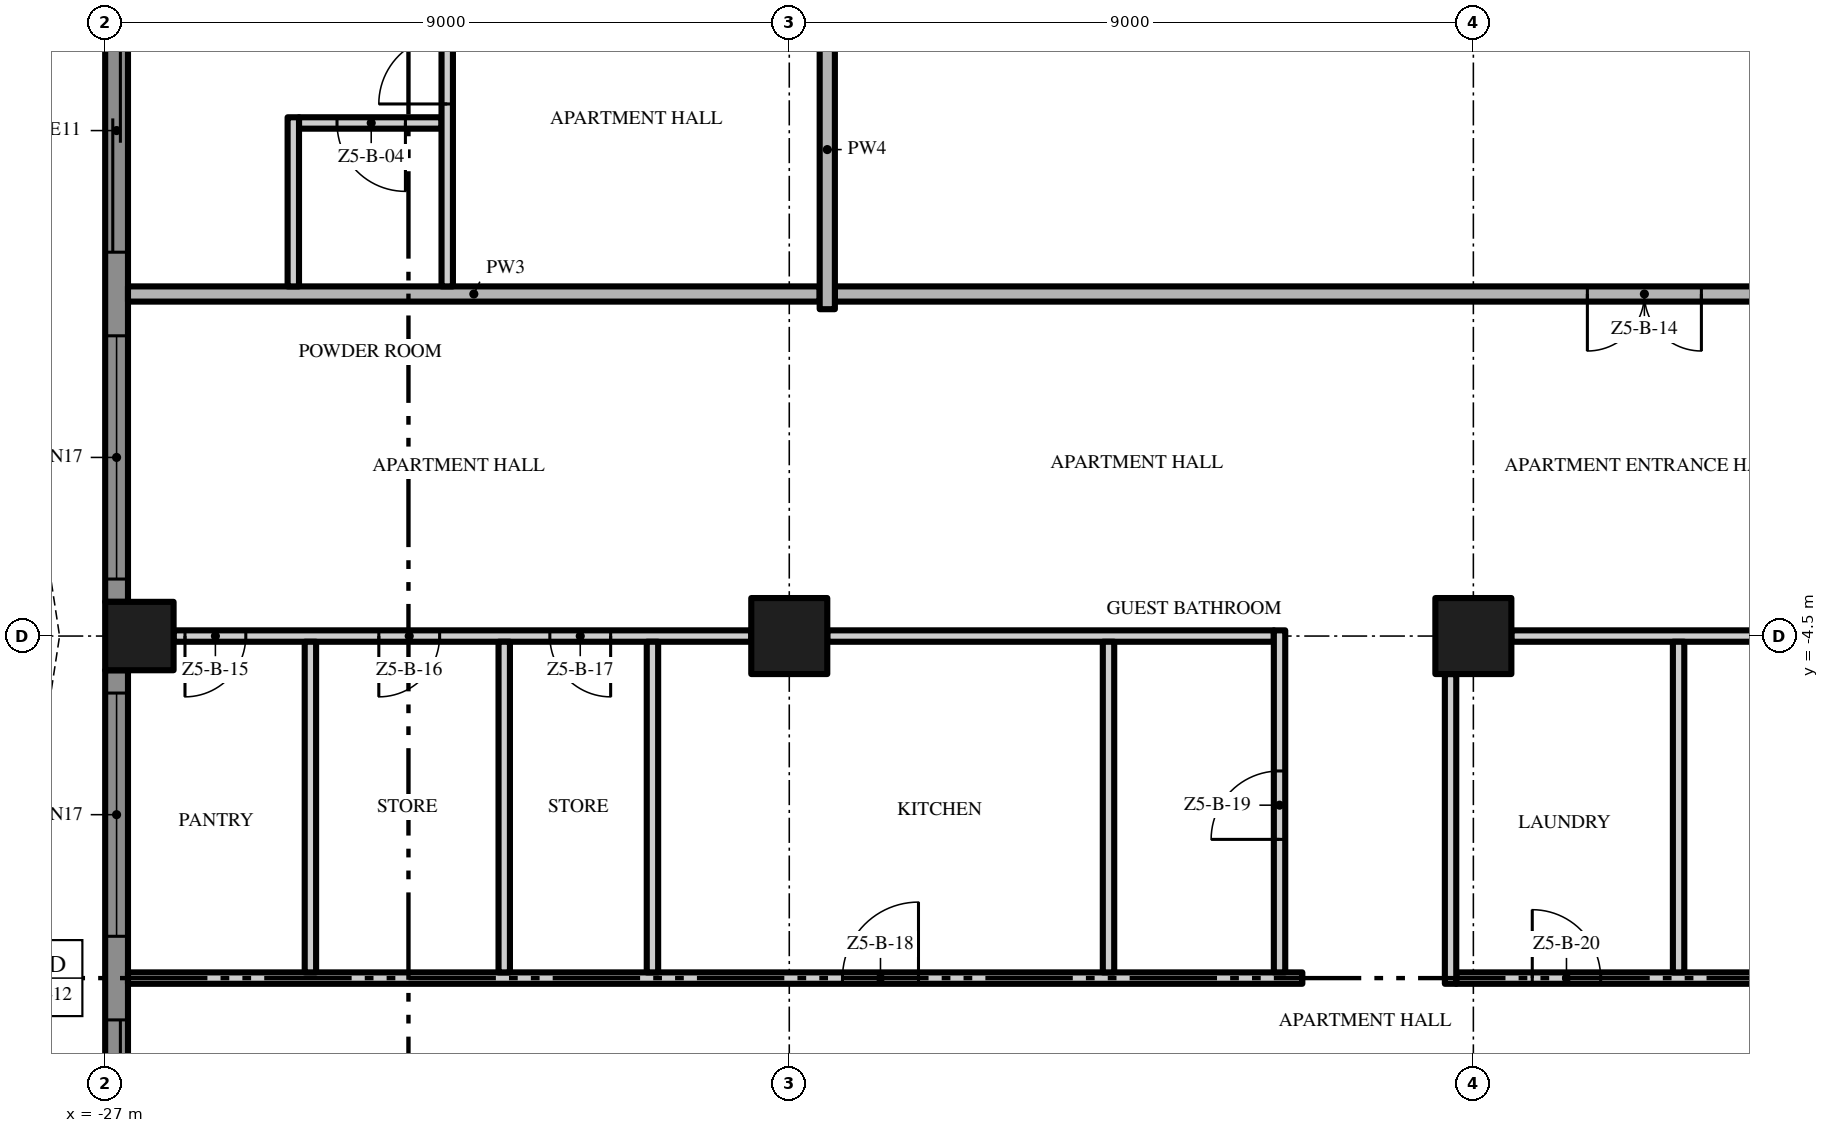
"""IFC4 building model, lengths in metres.
Left out: names, types, materials, properties, quantities, classifications, styles, units other than length and angle.
Written with IfcOpenShell. Run it as: python <this file> out.ifc"""

import sys

from ifc_helpers import new_model, si_unit, direction, frame, frame_2d, origin, origin_2d, place, context, subcontext, project, spatial, polyline, rectangle, outline, extrude, element, fill, save


model = new_model("IFC4")
c1 = context("Model", 3, precision=1e-05, world=origin(), true_north=direction((0.0, 1.0)))
c2 = subcontext(c1, "Body", "Model", "MODEL_VIEW")
j1 = project(units=[si_unit("LENGTHUNIT", "METRE"), si_unit("PLANEANGLEUNIT", "RADIAN")], contexts=[c1])
p1 = place(None, origin())
s1 = spatial("IfcSite", under=j1, at=p1, CompositionType="ELEMENT")
p2 = place(p1, origin())
s2 = spatial("IfcBuilding", under=s1, at=p2, CompositionType="ELEMENT")
p3 = place(p2, frame((0.0, 0.0, 250.2)))
s3 = spatial("IfcBuildingStorey", under=s2, at=p3, CompositionType="ELEMENT", Elevation=250.2)
p4 = place(p3, frame((-18.0, -4.5, 0.0), z_axis=(0.0, 0.0, 1.0), x_axis=(1.0, 0.0, 0.0)))
e1 = element("IfcColumn", 1, at=p4, inside=s3, PredefinedType="COLUMN", context=c2, shape_type="SweptSolid", body=[
    extrude(rectangle(XDim=1.0, YDim=1.0, at=origin_2d()), origin(), (0.0, 0.0, 1.0), 3.5),
])
p5 = place(p3, frame((-26.55, -4.5, 0.0), z_axis=(0.0, 0.0, 1.0), x_axis=(1.0, 0.0, 0.0)))
e2 = element("IfcColumn", 2, at=p5, inside=s3, PredefinedType="COLUMN", context=c2, shape_type="SweptSolid", body=[
    extrude(rectangle(XDim=0.9, YDim=0.9, at=origin_2d()), origin(), (0.0, 0.0, 1.0), 3.5),
])
p6 = place(p3, frame((-9.0, -4.5, 0.0), z_axis=(0.0, 0.0, 1.0), x_axis=(1.0, 0.0, 0.0)))
e3 = element("IfcColumn", 3, at=p6, inside=s3, PredefinedType="COLUMN", context=c2, shape_type="SweptSolid", body=[
    extrude(rectangle(XDim=1.0, YDim=1.0, at=origin_2d()), origin(), (0.0, 0.0, 1.0), 3.5),
])
p7 = place(p3, frame((-26.85, -4.05, 0.0), z_axis=(0.0, 0.0, 1.0), x_axis=(0.0, 1.0, 0.0)))
e4 = element("IfcWall", 4, at=p7, inside=s3, PredefinedType="SOLIDWALL", context=c2, shape_type="SweptSolid", body=[
    extrude(rectangle(XDim=8.1, YDim=0.3, at=frame_2d((4.05, 0.0))), origin(), (0.0, 0.0, 1.0), 3.5),
])
p8 = place(p7, frame((4.6, 0.0, 0.0)))
e5 = element("IfcOpeningElement", 5, at=p8, cuts=e4, PredefinedType="OPENING", context=c2, shape_type="SweptSolid", body=[
    extrude(rectangle(XDim=3.2, YDim=2.4, at=frame_2d((1.6, 1.2))), frame((0.0, 0.16, 0.0), z_axis=(0.0, -1.0, 0.0), x_axis=(1.0, 0.0, 0.0)), (0.0, 0.0, 1.0), 0.32),
])
p9 = place(p7, frame((0.3, 0.0, 0.45)))
e6 = element("IfcOpeningElement", 6, at=p9, cuts=e4, PredefinedType="OPENING", context=c2, shape_type="SweptSolid", body=[
    extrude(rectangle(XDim=3.2, YDim=2.65, at=frame_2d((1.6, 1.325))), frame((0.0, 0.16, 0.0), z_axis=(0.0, -1.0, 0.0), x_axis=(1.0, 0.0, 0.0)), (0.0, 0.0, 1.0), 0.32),
])
p10 = place(p3, frame((-26.85, -13.05, 0.0), z_axis=(0.0, 0.0, 1.0), x_axis=(0.0, 1.0, 0.0)))
e7 = element("IfcWall", 7, at=p10, inside=s3, PredefinedType="SOLIDWALL", context=c2, shape_type="SweptSolid", body=[
    extrude(rectangle(XDim=8.1, YDim=0.3, at=frame_2d((4.05, 0.0))), origin(), (0.0, 0.0, 1.0), 3.5),
])
p11 = place(p10, frame((4.6, 0.0, 0.45)))
e8 = element("IfcOpeningElement", 8, at=p11, cuts=e7, PredefinedType="OPENING", context=c2, shape_type="SweptSolid", body=[
    extrude(rectangle(XDim=3.2, YDim=2.65, at=frame_2d((1.6, 1.325))), frame((0.0, 0.16, 0.0), z_axis=(0.0, -1.0, 0.0), x_axis=(1.0, 0.0, 0.0)), (0.0, 0.0, 1.0), 0.32),
])
p12 = place(p10, frame((0.3, 0.0, 0.0)))
e9 = element("IfcOpeningElement", 9, at=p12, cuts=e7, PredefinedType="OPENING", context=c2, shape_type="SweptSolid", body=[
    extrude(rectangle(XDim=3.2, YDim=2.4, at=frame_2d((1.6, 1.2))), frame((0.0, 0.16, 0.0), z_axis=(0.0, -1.0, 0.0), x_axis=(1.0, 0.0, 0.0)), (0.0, 0.0, 1.0), 0.32),
])
p13 = place(p3, origin())
e10 = element("IfcWall", 10, at=p13, inside=s3, PredefinedType="USERDEFINED", context=c2, shape_type="SweptSolid", body=[
    extrude(outline(polyline([(-30.0, 18.0), (-29.771, 16.5), (-29.171, 15.0), (-28.429, 13.5), (-27.829, 12.0), (-27.6, 10.5), (-27.829, 9.0), (-28.429, 7.5), (-29.171, 6.0), (-29.771, 4.5), (-30.0, 3.0), (-29.771, 1.5), (-29.171, 0.0), (-28.429, -1.5), (-27.829, -3.0), (-27.6, -4.5), (-27.829, -6.0), (-28.429, -7.5), (-29.171, -9.0), (-29.771, -10.5), (-30.0, -12.0), (-29.771, -13.5), (-29.171, -15.0), (-28.429, -16.5), (-27.829, -18.0), (-27.597, -17.907), (-28.201, -16.398), (-28.942, -14.898), (-29.528, -13.434), (-29.747, -12.0), (-29.528, -10.566), (-28.942, -9.102), (-28.201, -7.602), (-27.586, -6.066), (-27.347, -4.5), (-27.586, -2.934), (-28.201, -1.398), (-28.942, 0.102), (-29.528, 1.566), (-29.747, 3.0), (-29.528, 4.434), (-28.942, 5.898), (-28.201, 7.398), (-27.586, 8.934), (-27.347, 10.5), (-27.586, 12.066), (-28.201, 13.602), (-28.942, 15.102), (-29.528, 16.566), (-29.753, 18.038), (-30.0, 18.0)])), origin(), (0.0, 0.0, 1.0), 0.9),
])
p14 = place(p3, frame((-26.7, -9.0, 0.0), z_axis=(0.0, 0.0, 1.0), x_axis=(1.0, 0.0, 0.0)))
e11 = element("IfcWall", 11, at=p14, inside=s3, PredefinedType="PARTITIONING", context=c2, shape_type="SweptSolid", body=[
    extrude(rectangle(XDim=15.45, YDim=0.15, at=frame_2d((7.725, 0.0))), origin(), (0.0, 0.0, 1.0), 3.5),
])
p15 = place(p14, frame((9.4, 0.0, 0.0)))
e12 = element("IfcOpeningElement", 12, at=p15, cuts=e11, PredefinedType="OPENING", context=c2, shape_type="SweptSolid", body=[
    extrude(rectangle(XDim=1.0, YDim=2.4, at=frame_2d((0.5, 1.2))), frame((0.0, 0.085, 0.0), z_axis=(0.0, -1.0, 0.0), x_axis=(1.0, 0.0, 0.0)), (0.0, 0.0, 1.0), 0.17),
])
p16 = place(p3, frame((-9.225, -9.0, 0.0), z_axis=(0.0, 0.0, 1.0), x_axis=(1.0, 0.0, 0.0)))
e13 = element("IfcWall", 13, at=p16, inside=s3, PredefinedType="PARTITIONING", context=c2, shape_type="SweptSolid", body=[
    extrude(rectangle(XDim=13.625, YDim=0.15, at=frame_2d((6.812, 0.0))), origin(), (0.0, 0.0, 1.0), 3.5),
])
p17 = place(p16, frame((1.0, 0.0, 0.0)))
e14 = element("IfcOpeningElement", 14, at=p17, cuts=e13, PredefinedType="OPENING", context=c2, shape_type="SweptSolid", body=[
    extrude(rectangle(XDim=0.9, YDim=2.1, at=frame_2d((0.45, 1.05))), frame((0.0, 0.085, 0.0), z_axis=(0.0, -1.0, 0.0), x_axis=(1.0, 0.0, 0.0)), (0.0, 0.0, 1.0), 0.17),
])
p18 = place(p16, frame((5.125, 0.0, 0.0)))
e15 = element("IfcOpeningElement", 15, at=p18, cuts=e13, PredefinedType="OPENING", context=c2, shape_type="SweptSolid", body=[
    extrude(rectangle(XDim=0.9, YDim=2.1, at=frame_2d((0.45, 1.05))), frame((0.0, 0.085, 0.0), z_axis=(0.0, -1.0, 0.0), x_axis=(1.0, 0.0, 0.0)), (0.0, 0.0, 1.0), 0.17),
])
p19 = place(p3, frame((-18.5, -4.5, 0.0), z_axis=(0.0, 0.0, 1.0), x_axis=(-1.0, 0.0, 0.0)))
e16 = element("IfcWall", 16, at=p19, inside=s3, PredefinedType="PARTITIONING", context=c2, shape_type="SweptSolid", body=[
    extrude(rectangle(XDim=7.6, YDim=0.15, at=frame_2d((3.8, 0.0))), origin(), (0.0, 0.0, 1.0), 3.5),
])
p20 = place(p19, frame((6.65, 0.0, 0.0)))
e17 = element("IfcOpeningElement", 17, at=p20, cuts=e16, PredefinedType="OPENING", context=c2, shape_type="SweptSolid", body=[
    extrude(rectangle(XDim=0.8, YDim=2.0, at=frame_2d((0.4, 1.0))), frame((0.0, 0.085, 0.0), z_axis=(0.0, -1.0, 0.0), x_axis=(1.0, 0.0, 0.0)), (0.0, 0.0, 1.0), 0.17),
])
p21 = place(p19, frame((4.1, 0.0, 0.0)))
e18 = element("IfcOpeningElement", 18, at=p21, cuts=e16, PredefinedType="OPENING", context=c2, shape_type="SweptSolid", body=[
    extrude(rectangle(XDim=0.8, YDim=2.0, at=frame_2d((0.4, 1.0))), frame((0.0, 0.085, 0.0), z_axis=(0.0, -1.0, 0.0), x_axis=(1.0, 0.0, 0.0)), (0.0, 0.0, 1.0), 0.17),
])
p22 = place(p19, frame((1.85, 0.0, 0.0)))
e19 = element("IfcOpeningElement", 19, at=p22, cuts=e16, PredefinedType="OPENING", context=c2, shape_type="SweptSolid", body=[
    extrude(rectangle(XDim=0.8, YDim=2.0, at=frame_2d((0.4, 1.0))), frame((0.0, 0.085, 0.0), z_axis=(0.0, -1.0, 0.0), x_axis=(1.0, 0.0, 0.0)), (0.0, 0.0, 1.0), 0.17),
])
p23 = place(p3, frame((-17.5, -4.5, 0.0), z_axis=(0.0, 0.0, 1.0), x_axis=(1.0, 0.0, 0.0)))
e20 = element("IfcWall", 20, at=p23, inside=s3, PredefinedType="PARTITIONING", context=c2, shape_type="SweptSolid", body=[
    extrude(rectangle(XDim=5.875, YDim=0.15, at=frame_2d((2.938, 0.0))), origin(), (0.0, 0.0, 1.0), 3.5),
])
p24 = place(p3, frame((-8.5, -4.5, 0.0), z_axis=(0.0, 0.0, 1.0), x_axis=(1.0, 0.0, 0.0)))
e21 = element("IfcWall", 21, at=p24, inside=s3, PredefinedType="PARTITIONING", context=c2, shape_type="SweptSolid", body=[
    extrude(rectangle(XDim=8.0, YDim=0.15, at=frame_2d((4.0, 0.0))), origin(), (0.0, 0.0, 1.0), 3.5),
])
p25 = place(p3, frame((17.4, 0.0, 0.0), z_axis=(0.0, 0.0, 1.0), x_axis=(-1.0, 0.0, 0.0)))
e22 = element("IfcWall", 22, at=p25, inside=s3, PredefinedType="PARTITIONING", context=c2, shape_type="SweptSolid", body=[
    extrude(rectangle(XDim=34.8, YDim=0.2, at=frame_2d((17.4, 0.0))), origin(), (0.0, 0.0, 1.0), 3.5),
])
p26 = place(p25, frame((23.4, 0.0, 0.0)))
e23 = element("IfcOpeningElement", 23, at=p26, cuts=e22, PredefinedType="OPENING", context=c2, shape_type="SweptSolid", body=[
    extrude(rectangle(XDim=1.5, YDim=2.4, at=frame_2d((0.75, 1.2))), frame((0.0, 0.11, 0.0), z_axis=(0.0, -1.0, 0.0), x_axis=(1.0, 0.0, 0.0)), (0.0, 0.0, 1.0), 0.22),
])
p27 = place(p25, frame((5.4, 0.0, 0.0)))
e24 = element("IfcOpeningElement", 24, at=p27, cuts=e22, PredefinedType="OPENING", context=c2, shape_type="SweptSolid", body=[
    extrude(rectangle(XDim=1.5, YDim=2.4, at=frame_2d((0.75, 1.2))), frame((0.0, 0.11, 0.0), z_axis=(0.0, -1.0, 0.0), x_axis=(1.0, 0.0, 0.0)), (0.0, 0.0, 1.0), 0.22),
])
p28 = place(p3, frame((-26.7, 0.0, 0.0), z_axis=(0.0, 0.0, 1.0), x_axis=(1.0, 0.0, 0.0)))
e25 = element("IfcWall", 25, at=p28, inside=s3, PredefinedType="PARTITIONING", context=c2, shape_type="SweptSolid", body=[
    extrude(rectangle(XDim=9.1, YDim=0.2, at=frame_2d((4.55, 0.0))), origin(), (0.0, 0.0, 1.0), 3.5),
])
p29 = place(p3, frame((-22.575, 2.25, 0.0), z_axis=(0.0, 0.0, 1.0), x_axis=(-1.0, 0.0, 0.0)))
e26 = element("IfcWall", 26, at=p29, inside=s3, PredefinedType="PARTITIONING", context=c2, shape_type="SweptSolid", body=[
    extrude(rectangle(XDim=1.875, YDim=0.15, at=frame_2d((0.938, 0.0))), origin(), (0.0, 0.0, 1.0), 3.5),
])
p30 = place(p29, frame((0.475, 0.0, 0.0)))
e27 = element("IfcOpeningElement", 27, at=p30, cuts=e26, PredefinedType="OPENING", context=c2, shape_type="SweptSolid", body=[
    extrude(rectangle(XDim=0.9, YDim=2.1, at=frame_2d((0.45, 1.05))), frame((0.0, 0.085, 0.0), z_axis=(0.0, -1.0, 0.0), x_axis=(1.0, 0.0, 0.0)), (0.0, 0.0, 1.0), 0.17),
])
p31 = place(p3, frame((-24.525, 0.1, 0.0), z_axis=(0.0, 0.0, 1.0), x_axis=(0.0, 1.0, 0.0)))
e28 = element("IfcWall", 28, at=p31, inside=s3, PredefinedType="PARTITIONING", context=c2, shape_type="SweptSolid", body=[
    extrude(rectangle(XDim=2.225, YDim=0.15, at=frame_2d((1.113, 0.0))), origin(), (0.0, 0.0, 1.0), 3.5),
])
p32 = place(p3, frame((-24.3, -8.925, 0.0), z_axis=(0.0, 0.0, 1.0), x_axis=(0.0, 1.0, 0.0)))
e29 = element("IfcWall", 29, at=p32, inside=s3, PredefinedType="PARTITIONING", context=c2, shape_type="SweptSolid", body=[
    extrude(rectangle(XDim=4.35, YDim=0.15, at=frame_2d((2.175, 0.0))), origin(), (0.0, 0.0, 1.0), 3.5),
])
p33 = place(p3, frame((-22.5, 0.1, 0.0), z_axis=(0.0, 0.0, 1.0), x_axis=(0.0, 1.0, 0.0)))
e30 = element("IfcWall", 30, at=p33, inside=s3, PredefinedType="PARTITIONING", context=c2, shape_type="SweptSolid", body=[
    extrude(rectangle(XDim=17.45, YDim=0.15, at=frame_2d((8.725, 0.0))), origin(), (0.0, 0.0, 1.0), 3.5),
])
p34 = place(p33, frame((2.4, 0.0, 0.0)))
e31 = element("IfcOpeningElement", 31, at=p34, cuts=e30, PredefinedType="OPENING", context=c2, shape_type="SweptSolid", body=[
    extrude(rectangle(XDim=1.8, YDim=2.4, at=frame_2d((0.9, 1.2))), frame((0.0, 0.085, 0.0), z_axis=(0.0, -1.0, 0.0), x_axis=(1.0, 0.0, 0.0)), (0.0, 0.0, 1.0), 0.17),
])
p35 = place(p33, frame((10.65, 0.0, 0.0)))
e32 = element("IfcOpeningElement", 32, at=p35, cuts=e30, PredefinedType="OPENING", context=c2, shape_type="SweptSolid", body=[
    extrude(rectangle(XDim=1.0, YDim=2.4, at=frame_2d((0.5, 1.2))), frame((0.0, 0.085, 0.0), z_axis=(0.0, -1.0, 0.0), x_axis=(1.0, 0.0, 0.0)), (0.0, 0.0, 1.0), 0.17),
])
for number, where, z_axis, x_axis in (
    (33, (-21.75, -8.925, 0.0), (0.0, 0.0, 1.0), (0.0, 1.0, 0.0)),
    (34, (-19.8, -8.925, 0.0), (0.0, 0.0, 1.0), (0.0, 1.0, 0.0)),
):
    element("IfcWall", number, at=place(p3, frame(where, z_axis=z_axis, x_axis=x_axis)), inside=s3, PredefinedType="PARTITIONING", context=c2, shape_type="SweptSolid", body=[
        extrude(rectangle(XDim=4.35, YDim=0.15, at=frame_2d((2.175, 0.0))), origin(), (0.0, 0.0, 1.0), 3.5),
    ])
p36 = place(p3, frame((-17.5, -0.2, 0.0), z_axis=(0.0, 0.0, 1.0), x_axis=(0.0, 1.0, 0.0)))
e35 = element("IfcWall", 35, at=p36, inside=s3, PredefinedType="PARTITIONING", context=c2, shape_type="SweptSolid", body=[
    extrude(rectangle(XDim=4.2, YDim=0.2, at=frame_2d((2.1, 0.0))), origin(), (0.0, 0.0, 1.0), 3.5),
])
p37 = place(p3, frame((-13.8, -8.925, 0.0), z_axis=(0.0, 0.0, 1.0), x_axis=(0.0, 1.0, 0.0)))
e36 = element("IfcWall", 36, at=p37, inside=s3, PredefinedType="PARTITIONING", context=c2, shape_type="SweptSolid", body=[
    extrude(rectangle(XDim=4.35, YDim=0.15, at=frame_2d((2.175, 0.0))), origin(), (0.0, 0.0, 1.0), 3.5),
])
p38 = place(p3, frame((-11.55, -8.925, 0.0), z_axis=(0.0, 0.0, 1.0), x_axis=(0.0, 1.0, 0.0)))
e37 = element("IfcWall", 37, at=p38, inside=s3, PredefinedType="PARTITIONING", context=c2, shape_type="SweptSolid", body=[
    extrude(rectangle(XDim=4.5, YDim=0.15, at=frame_2d((2.25, 0.0))), origin(), (0.0, 0.0, 1.0), 3.5),
])
p39 = place(p38, frame((1.75, 0.0, 0.0)))
e38 = element("IfcOpeningElement", 38, at=p39, cuts=e37, PredefinedType="OPENING", context=c2, shape_type="SweptSolid", body=[
    extrude(rectangle(XDim=0.9, YDim=2.1, at=frame_2d((0.45, 1.05))), frame((0.0, 0.085, 0.0), z_axis=(0.0, -1.0, 0.0), x_axis=(1.0, 0.0, 0.0)), (0.0, 0.0, 1.0), 0.17),
])
p40 = place(p3, frame((-9.3, -9.075, 0.0), z_axis=(0.0, 0.0, 1.0), x_axis=(0.0, 1.0, 0.0)))
e39 = element("IfcWall", 39, at=p40, inside=s3, PredefinedType="PARTITIONING", context=c2, shape_type="SweptSolid", body=[
    extrude(rectangle(XDim=4.075, YDim=0.15, at=frame_2d((2.038, 0.0))), origin(), (0.0, 0.0, 1.0), 3.5),
])
p41 = place(p3, frame((-6.3, -8.925, 0.0), z_axis=(0.0, 0.0, 1.0), x_axis=(0.0, 1.0, 0.0)))
e40 = element("IfcWall", 40, at=p41, inside=s3, PredefinedType="PARTITIONING", context=c2, shape_type="SweptSolid", body=[
    extrude(rectangle(XDim=4.35, YDim=0.15, at=frame_2d((2.175, 0.0))), origin(), (0.0, 0.0, 1.0), 3.5),
])
p42 = place(p8, origin())
e41 = element("IfcDoor", 41, at=p42, inside=s3, OperationType="SINGLE_SWING_LEFT", PredefinedType="DOOR", context=c2, shape_type="SweptSolid", body=[
    extrude(rectangle(XDim=3.2, YDim=2.4, at=frame_2d((1.6, 1.2))), frame((0.0, 0.025, 0.0), z_axis=(0.0, -1.0, 0.0), x_axis=(1.0, 0.0, 0.0)), (0.0, 0.0, 1.0), 0.05),
])
fill(e5, e41)
p43 = place(p9, origin())
e42 = element("IfcWindow", 42, at=p43, inside=s3, PartitioningType="SINGLE_PANEL", PredefinedType="WINDOW", context=c2, shape_type="SweptSolid", body=[
    extrude(rectangle(XDim=3.2, YDim=2.65, at=frame_2d((1.6, 1.325))), frame((0.0, 0.03, 0.0), z_axis=(0.0, -1.0, 0.0), x_axis=(1.0, 0.0, 0.0)), (0.0, 0.0, 1.0), 0.06),
])
fill(e6, e42)
p44 = place(p11, origin())
e43 = element("IfcWindow", 43, at=p44, inside=s3, PartitioningType="SINGLE_PANEL", PredefinedType="WINDOW", context=c2, shape_type="SweptSolid", body=[
    extrude(rectangle(XDim=3.2, YDim=2.65, at=frame_2d((1.6, 1.325))), frame((0.0, 0.03, 0.0), z_axis=(0.0, -1.0, 0.0), x_axis=(1.0, 0.0, 0.0)), (0.0, 0.0, 1.0), 0.06),
])
fill(e8, e43)
p45 = place(p12, origin())
e44 = element("IfcDoor", 44, at=p45, inside=s3, OperationType="SINGLE_SWING_LEFT", PredefinedType="DOOR", context=c2, shape_type="SweptSolid", body=[
    extrude(rectangle(XDim=3.2, YDim=2.4, at=frame_2d((1.6, 1.2))), frame((0.0, 0.025, 0.0), z_axis=(0.0, -1.0, 0.0), x_axis=(1.0, 0.0, 0.0)), (0.0, 0.0, 1.0), 0.05),
])
fill(e9, e44)
p46 = place(p34, origin())
e45 = element("IfcDoor", 45, at=p46, inside=s3, OperationType="DOUBLE_DOOR_SINGLE_SWING", PredefinedType="DOOR", context=c2, shape_type="SweptSolid", body=[
    extrude(rectangle(XDim=1.8, YDim=2.4, at=frame_2d((0.9, 1.2))), frame((0.0, 0.025, 0.0), z_axis=(0.0, -1.0, 0.0), x_axis=(1.0, 0.0, 0.0)), (0.0, 0.0, 1.0), 0.05),
])
fill(e31, e45)
p47 = place(p30, origin())
e46 = element("IfcDoor", 46, at=p47, inside=s3, OperationType="SINGLE_SWING_LEFT", PredefinedType="DOOR", context=c2, shape_type="SweptSolid", body=[
    extrude(rectangle(XDim=0.9, YDim=2.1, at=frame_2d((0.45, 1.05))), frame((0.0, 0.025, 0.0), z_axis=(0.0, -1.0, 0.0), x_axis=(1.0, 0.0, 0.0)), (0.0, 0.0, 1.0), 0.05),
])
fill(e27, e46)
p48 = place(p26, origin())
e47 = element("IfcDoor", 47, at=p48, inside=s3, OperationType="DOUBLE_DOOR_SINGLE_SWING", PredefinedType="DOOR", context=c2, shape_type="SweptSolid", body=[
    extrude(rectangle(XDim=1.5, YDim=2.4, at=frame_2d((0.75, 1.2))), frame((0.0, 0.025, 0.0), z_axis=(0.0, -1.0, 0.0), x_axis=(1.0, 0.0, 0.0)), (0.0, 0.0, 1.0), 0.05),
])
fill(e23, e47)
p49 = place(p20, origin())
e48 = element("IfcDoor", 48, at=p49, inside=s3, OperationType="SINGLE_SWING_RIGHT", PredefinedType="DOOR", context=c2, shape_type="SweptSolid", body=[
    extrude(rectangle(XDim=0.8, YDim=2.0, at=frame_2d((0.4, 1.0))), frame((0.0, 0.025, 0.0), z_axis=(0.0, -1.0, 0.0), x_axis=(1.0, 0.0, 0.0)), (0.0, 0.0, 1.0), 0.05),
])
fill(e17, e48)
p50 = place(p21, origin())
e49 = element("IfcDoor", 49, at=p50, inside=s3, OperationType="SINGLE_SWING_RIGHT", PredefinedType="DOOR", context=c2, shape_type="SweptSolid", body=[
    extrude(rectangle(XDim=0.8, YDim=2.0, at=frame_2d((0.4, 1.0))), frame((0.0, 0.025, 0.0), z_axis=(0.0, -1.0, 0.0), x_axis=(1.0, 0.0, 0.0)), (0.0, 0.0, 1.0), 0.05),
])
fill(e18, e49)
p51 = place(p22, origin())
e50 = element("IfcDoor", 50, at=p51, inside=s3, OperationType="SINGLE_SWING_LEFT", PredefinedType="DOOR", context=c2, shape_type="SweptSolid", body=[
    extrude(rectangle(XDim=0.8, YDim=2.0, at=frame_2d((0.4, 1.0))), frame((0.0, 0.025, 0.0), z_axis=(0.0, -1.0, 0.0), x_axis=(1.0, 0.0, 0.0)), (0.0, 0.0, 1.0), 0.05),
])
fill(e19, e50)
p52 = place(p15, origin())
e51 = element("IfcDoor", 51, at=p52, inside=s3, OperationType="SINGLE_SWING_RIGHT", PredefinedType="DOOR", context=c2, shape_type="SweptSolid", body=[
    extrude(rectangle(XDim=1.0, YDim=2.4, at=frame_2d((0.5, 1.2))), frame((0.0, 0.025, 0.0), z_axis=(0.0, -1.0, 0.0), x_axis=(1.0, 0.0, 0.0)), (0.0, 0.0, 1.0), 0.05),
])
fill(e12, e51)
p53 = place(p39, origin())
e52 = element("IfcDoor", 52, at=p53, inside=s3, OperationType="SINGLE_SWING_LEFT", PredefinedType="DOOR", context=c2, shape_type="SweptSolid", body=[
    extrude(rectangle(XDim=0.9, YDim=2.1, at=frame_2d((0.45, 1.05))), frame((0.0, 0.025, 0.0), z_axis=(0.0, -1.0, 0.0), x_axis=(1.0, 0.0, 0.0)), (0.0, 0.0, 1.0), 0.05),
])
fill(e38, e52)
p54 = place(p17, origin())
e53 = element("IfcDoor", 53, at=p54, inside=s3, OperationType="SINGLE_SWING_LEFT", PredefinedType="DOOR", context=c2, shape_type="SweptSolid", body=[
    extrude(rectangle(XDim=0.9, YDim=2.1, at=frame_2d((0.45, 1.05))), frame((0.0, 0.025, 0.0), z_axis=(0.0, -1.0, 0.0), x_axis=(1.0, 0.0, 0.0)), (0.0, 0.0, 1.0), 0.05),
])
fill(e14, e53)
save(model, sys.argv[1])
